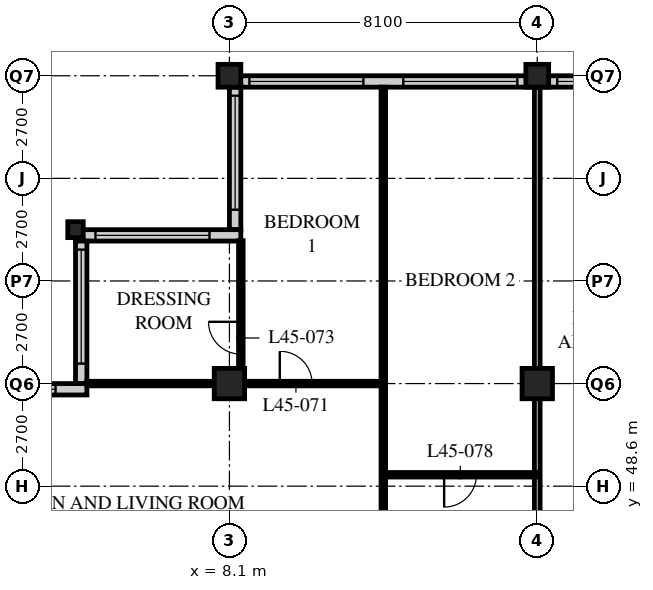
"""IFC4 building model, lengths in metres.
Left out: names, types, materials, properties, quantities, classifications, styles, units other than length and angle.
Written with IfcOpenShell. Run it as: python <this file> out.ifc"""

import sys

from ifc_helpers import new_model, si_unit, direction, frame, frame_2d, origin, origin_2d, place, context, subcontext, project, spatial, rectangle, hollow_rectangle, i_section, extrude, element, fill, save


model = new_model("IFC4")
c1 = context("Model", 3, precision=1e-05, world=origin(), true_north=direction((0.0, 1.0)))
c2 = subcontext(c1, "Body", "Model", "MODEL_VIEW")
j1 = project(units=[si_unit("LENGTHUNIT", "METRE"), si_unit("PLANEANGLEUNIT", "RADIAN")], contexts=[c1])
p1 = place(None, origin())
s1 = spatial("IfcSite", under=j1, at=p1, CompositionType="ELEMENT")
p2 = place(p1, origin())
s2 = spatial("IfcBuilding", under=s1, at=p2, CompositionType="ELEMENT")
p3 = place(p2, frame((0.0, 0.0, 177.6)))
s3 = spatial("IfcBuildingStorey", under=s2, at=p3, CompositionType="ELEMENT", Elevation=177.6)
p4 = place(p3, frame((4.05, 55.35, 0.0), z_axis=(0.0, 0.0, 1.0), x_axis=(1.0, 0.0, 0.0)))
e1 = element("IfcColumn", 1, at=p4, inside=s3, PredefinedType="COLUMN", context=c2, shape_type="SweptSolid", body=[
    extrude(i_section(OverallWidth=0.407, OverallDepth=0.419, WebThickness=0.031, FlangeThickness=0.049, FilletRadius=0.015, at=origin_2d()), origin(), (0.0, 0.0, 1.0), 3.6),
])
p5 = place(p3, frame((8.1, 51.3, 0.0), z_axis=(0.0, 0.0, 1.0), x_axis=(1.0, 0.0, 0.0)))
e2 = element("IfcColumn", 2, at=p5, inside=s3, PredefinedType="COLUMN", context=c2, shape_type="SweptSolid", body=[
    extrude(hollow_rectangle(XDim=0.8, YDim=0.8, WallThickness=0.08, at=origin_2d()), origin(), (0.0, 0.0, 1.0), 3.6),
])
p6 = place(p3, frame((8.1, 59.4, 0.0), z_axis=(0.0, 0.0, 1.0), x_axis=(1.0, 0.0, 0.0)))
e3 = element("IfcColumn", 3, at=p6, inside=s3, PredefinedType="COLUMN", context=c2, shape_type="SweptSolid", body=[
    extrude(hollow_rectangle(XDim=0.6, YDim=0.6, WallThickness=0.05, at=origin_2d()), origin(), (0.0, 0.0, 1.0), 3.6),
])
p7 = place(p3, frame((16.2, 51.3, 0.0), z_axis=(0.0, 0.0, 1.0), x_axis=(1.0, 0.0, 0.0)))
e4 = element("IfcColumn", 4, at=p7, inside=s3, PredefinedType="COLUMN", context=c2, shape_type="SweptSolid", body=[
    extrude(hollow_rectangle(XDim=0.8, YDim=0.8, WallThickness=0.08, at=origin_2d()), origin(), (0.0, 0.0, 1.0), 3.6),
])
p8 = place(p3, frame((16.2, 59.4, 0.0), z_axis=(0.0, 0.0, 1.0), x_axis=(1.0, 0.0, 0.0)))
e5 = element("IfcColumn", 5, at=p8, inside=s3, PredefinedType="COLUMN", context=c2, shape_type="SweptSolid", body=[
    extrude(hollow_rectangle(XDim=0.6, YDim=0.6, WallThickness=0.05, at=origin_2d()), origin(), (0.0, 0.0, 1.0), 3.6),
])
p9 = place(p3, frame((48.3, 59.25, 0.0), z_axis=(0.0, 0.0, 1.0), x_axis=(-1.0, 0.0, 0.0)))
e6 = element("IfcWall", 6, at=p9, inside=s3, PredefinedType="SOLIDWALL", context=c2, shape_type="SweptSolid", body=[
    extrude(rectangle(XDim=40.2, YDim=0.3, at=frame_2d((20.1, 0.0))), origin(), (0.0, 0.0, 1.0), 3.39),
])
p10 = place(p9, frame((0.225, 0.0, 0.6)))
e7 = element("IfcOpeningElement", 7, at=p10, cuts=e6, PredefinedType="OPENING", context=c2, shape_type="SweptSolid", body=[
    extrude(rectangle(XDim=3.0, YDim=2.4, at=frame_2d((1.5, 1.2))), frame((0.0, 0.16, 0.0), z_axis=(0.0, -1.0, 0.0), x_axis=(1.0, 0.0, 0.0)), (0.0, 0.0, 1.0), 0.32),
])
p11 = place(p9, frame((4.275, 0.0, 0.6)))
e8 = element("IfcOpeningElement", 8, at=p11, cuts=e6, PredefinedType="OPENING", context=c2, shape_type="SweptSolid", body=[
    extrude(rectangle(XDim=3.0, YDim=2.4, at=frame_2d((1.5, 1.2))), frame((0.0, 0.16, 0.0), z_axis=(0.0, -1.0, 0.0), x_axis=(1.0, 0.0, 0.0)), (0.0, 0.0, 1.0), 0.32),
])
p12 = place(p9, frame((8.325, 0.0, 0.6)))
e9 = element("IfcOpeningElement", 9, at=p12, cuts=e6, PredefinedType="OPENING", context=c2, shape_type="SweptSolid", body=[
    extrude(rectangle(XDim=3.0, YDim=2.4, at=frame_2d((1.5, 1.2))), frame((0.0, 0.16, 0.0), z_axis=(0.0, -1.0, 0.0), x_axis=(1.0, 0.0, 0.0)), (0.0, 0.0, 1.0), 0.32),
])
p13 = place(p9, frame((12.375, 0.0, 0.6)))
e10 = element("IfcOpeningElement", 10, at=p13, cuts=e6, PredefinedType="OPENING", context=c2, shape_type="SweptSolid", body=[
    extrude(rectangle(XDim=3.0, YDim=2.4, at=frame_2d((1.5, 1.2))), frame((0.0, 0.16, 0.0), z_axis=(0.0, -1.0, 0.0), x_axis=(1.0, 0.0, 0.0)), (0.0, 0.0, 1.0), 0.32),
])
p14 = place(p9, frame((16.425, 0.0, 0.6)))
e11 = element("IfcOpeningElement", 11, at=p14, cuts=e6, PredefinedType="OPENING", context=c2, shape_type="SweptSolid", body=[
    extrude(rectangle(XDim=3.0, YDim=2.4, at=frame_2d((1.5, 1.2))), frame((0.0, 0.16, 0.0), z_axis=(0.0, -1.0, 0.0), x_axis=(1.0, 0.0, 0.0)), (0.0, 0.0, 1.0), 0.32),
])
p15 = place(p9, frame((20.475, 0.0, 0.6)))
e12 = element("IfcOpeningElement", 12, at=p15, cuts=e6, PredefinedType="OPENING", context=c2, shape_type="SweptSolid", body=[
    extrude(rectangle(XDim=3.0, YDim=2.4, at=frame_2d((1.5, 1.2))), frame((0.0, 0.16, 0.0), z_axis=(0.0, -1.0, 0.0), x_axis=(1.0, 0.0, 0.0)), (0.0, 0.0, 1.0), 0.32),
])
p16 = place(p9, frame((24.525, 0.0, 0.6)))
e13 = element("IfcOpeningElement", 13, at=p16, cuts=e6, PredefinedType="OPENING", context=c2, shape_type="SweptSolid", body=[
    extrude(rectangle(XDim=3.0, YDim=2.4, at=frame_2d((1.5, 1.2))), frame((0.0, 0.16, 0.0), z_axis=(0.0, -1.0, 0.0), x_axis=(1.0, 0.0, 0.0)), (0.0, 0.0, 1.0), 0.32),
])
p17 = place(p9, frame((28.575, 0.0, 0.6)))
e14 = element("IfcOpeningElement", 14, at=p17, cuts=e6, PredefinedType="OPENING", context=c2, shape_type="SweptSolid", body=[
    extrude(rectangle(XDim=3.0, YDim=2.4, at=frame_2d((1.5, 1.2))), frame((0.0, 0.16, 0.0), z_axis=(0.0, -1.0, 0.0), x_axis=(1.0, 0.0, 0.0)), (0.0, 0.0, 1.0), 0.32),
])
p18 = place(p9, frame((32.625, 0.0, 0.6)))
e15 = element("IfcOpeningElement", 15, at=p18, cuts=e6, PredefinedType="OPENING", context=c2, shape_type="SweptSolid", body=[
    extrude(rectangle(XDim=3.0, YDim=2.4, at=frame_2d((1.5, 1.2))), frame((0.0, 0.16, 0.0), z_axis=(0.0, -1.0, 0.0), x_axis=(1.0, 0.0, 0.0)), (0.0, 0.0, 1.0), 0.32),
])
p19 = place(p9, frame((36.675, 0.0, 0.6)))
e16 = element("IfcOpeningElement", 16, at=p19, cuts=e6, PredefinedType="OPENING", context=c2, shape_type="SweptSolid", body=[
    extrude(rectangle(XDim=3.0, YDim=2.4, at=frame_2d((1.5, 1.2))), frame((0.0, 0.16, 0.0), z_axis=(0.0, -1.0, 0.0), x_axis=(1.0, 0.0, 0.0)), (0.0, 0.0, 1.0), 0.32),
])
p20 = place(p3, frame((8.25, 59.1, 0.0), z_axis=(0.0, 0.0, 1.0), x_axis=(0.0, -1.0, 0.0)))
e17 = element("IfcWall", 17, at=p20, inside=s3, PredefinedType="SOLIDWALL", context=c2, shape_type="SweptSolid", body=[
    extrude(rectangle(XDim=3.75, YDim=0.3, at=frame_2d((1.875, 0.0))), origin(), (0.0, 0.0, 1.0), 3.39),
])
p21 = place(p20, frame((0.225, 0.0, 0.6)))
e18 = element("IfcOpeningElement", 18, at=p21, cuts=e17, PredefinedType="OPENING", context=c2, shape_type="SweptSolid", body=[
    extrude(rectangle(XDim=3.0, YDim=2.0, at=frame_2d((1.5, 1.0))), frame((0.0, 0.16, 0.0), z_axis=(0.0, -1.0, 0.0), x_axis=(1.0, 0.0, 0.0)), (0.0, 0.0, 1.0), 0.32),
])
p22 = place(p3, frame((8.4, 55.2, 0.0), z_axis=(0.0, 0.0, 1.0), x_axis=(-1.0, 0.0, 0.0)))
e19 = element("IfcWall", 19, at=p22, inside=s3, PredefinedType="SOLIDWALL", context=c2, shape_type="SweptSolid", body=[
    extrude(rectangle(XDim=4.35, YDim=0.3, at=frame_2d((2.175, 0.0))), origin(), (0.0, 0.0, 1.0), 3.39),
])
p23 = place(p22, frame((0.825, 0.0, 0.6)))
e20 = element("IfcOpeningElement", 20, at=p23, cuts=e19, PredefinedType="OPENING", context=c2, shape_type="SweptSolid", body=[
    extrude(rectangle(XDim=3.0, YDim=2.0, at=frame_2d((1.5, 1.0))), frame((0.0, 0.16, 0.0), z_axis=(0.0, -1.0, 0.0), x_axis=(1.0, 0.0, 0.0)), (0.0, 0.0, 1.0), 0.32),
])
p24 = place(p3, frame((4.2, 55.05, 0.0), z_axis=(0.0, 0.0, 1.0), x_axis=(0.0, -1.0, 0.0)))
e21 = element("IfcWall", 21, at=p24, inside=s3, PredefinedType="SOLIDWALL", context=c2, shape_type="SweptSolid", body=[
    extrude(rectangle(XDim=3.75, YDim=0.3, at=frame_2d((1.875, 0.0))), origin(), (0.0, 0.0, 1.0), 3.39),
])
p25 = place(p24, frame((0.225, 0.0, 0.6)))
e22 = element("IfcOpeningElement", 22, at=p25, cuts=e21, PredefinedType="OPENING", context=c2, shape_type="SweptSolid", body=[
    extrude(rectangle(XDim=3.0, YDim=2.0, at=frame_2d((1.5, 1.0))), frame((0.0, 0.16, 0.0), z_axis=(0.0, -1.0, 0.0), x_axis=(1.0, 0.0, 0.0)), (0.0, 0.0, 1.0), 0.32),
])
p26 = place(p3, frame((4.35, 51.15, 0.0), z_axis=(0.0, 0.0, 1.0), x_axis=(-1.0, 0.0, 0.0)))
e23 = element("IfcWall", 23, at=p26, inside=s3, PredefinedType="SOLIDWALL", context=c2, shape_type="SweptSolid", body=[
    extrude(rectangle(XDim=4.35, YDim=0.3, at=frame_2d((2.175, 0.0))), origin(), (0.0, 0.0, 1.0), 3.39),
])
p27 = place(p26, frame((0.825, 0.0, 0.6)))
e24 = element("IfcOpeningElement", 24, at=p27, cuts=e23, PredefinedType="OPENING", context=c2, shape_type="SweptSolid", body=[
    extrude(rectangle(XDim=3.0, YDim=2.0, at=frame_2d((1.5, 1.0))), frame((0.0, 0.16, 0.0), z_axis=(0.0, -1.0, 0.0), x_axis=(1.0, 0.0, 0.0)), (0.0, 0.0, 1.0), 0.32),
])
p28 = place(p3, frame((12.15, 45.6, 0.0), z_axis=(0.0, 0.0, 1.0), x_axis=(0.0, 1.0, 0.0)))
e25 = element("IfcWall", 25, at=p28, inside=s3, PredefinedType="PARTITIONING", context=c2, shape_type="SweptSolid", body=[
    extrude(rectangle(XDim=13.5, YDim=0.12, at=frame_2d((6.75, 0.0))), origin(), (0.0, 0.0, 1.0), 3.39),
])
p29 = place(p3, frame((12.15, 51.3, 0.0), z_axis=(0.0, 0.0, 1.0), x_axis=(-1.0, 0.0, 0.0)))
e26 = element("IfcWall", 26, at=p29, inside=s3, PredefinedType="PARTITIONING", context=c2, shape_type="SweptSolid", body=[
    extrude(rectangle(XDim=7.8, YDim=0.12, at=frame_2d((3.9, 0.0))), origin(), (0.0, 0.0, 1.0), 2.778),
])
p30 = place(p29, frame((1.875, 0.0, 0.0)))
e27 = element("IfcOpeningElement", 27, at=p30, cuts=e26, PredefinedType="OPENING", context=c2, shape_type="SweptSolid", body=[
    extrude(rectangle(XDim=0.85, YDim=2.1, at=frame_2d((0.425, 1.05))), frame((0.0, 0.07, 0.0), z_axis=(0.0, -1.0, 0.0), x_axis=(1.0, 0.0, 0.0)), (0.0, 0.0, 1.0), 0.14),
])
p31 = place(p3, frame((16.2, 43.2, 0.0), z_axis=(0.0, 0.0, 1.0), x_axis=(0.0, 1.0, 0.0)))
e28 = element("IfcWall", 28, at=p31, inside=s3, PredefinedType="PARTITIONING", context=c2, shape_type="SweptSolid", body=[
    extrude(rectangle(XDim=15.9, YDim=0.15, at=frame_2d((7.95, 0.0))), origin(), (0.0, 0.0, 1.0), 2.778),
])
p32 = place(p3, frame((8.4, 55.06, 0.0), z_axis=(0.0, 0.0, 1.0), x_axis=(0.0, -1.0, 0.0)))
e29 = element("IfcWall", 29, at=p32, inside=s3, PredefinedType="PARTITIONING", context=c2, shape_type="SweptSolid", body=[
    extrude(rectangle(XDim=3.76, YDim=0.12, at=frame_2d((1.88, 0.0))), origin(), (0.0, 0.0, 1.0), 3.39),
])
p33 = place(p32, frame((2.135, 0.0, 0.0)))
e30 = element("IfcOpeningElement", 30, at=p33, cuts=e29, PredefinedType="OPENING", context=c2, shape_type="SweptSolid", body=[
    extrude(rectangle(XDim=0.85, YDim=2.1, at=frame_2d((0.425, 1.05))), frame((0.0, 0.07, 0.0), z_axis=(0.0, -1.0, 0.0), x_axis=(1.0, 0.0, 0.0)), (0.0, 0.0, 1.0), 0.14),
])
p34 = place(p3, frame((12.15, 48.9, 0.0), z_axis=(0.0, 0.0, 1.0), x_axis=(1.0, 0.0, 0.0)))
e31 = element("IfcWall", 31, at=p34, inside=s3, PredefinedType="PARTITIONING", context=c2, shape_type="SweptSolid", body=[
    extrude(rectangle(XDim=4.05, YDim=0.12, at=frame_2d((2.025, 0.0))), origin(), (0.0, 0.0, 1.0), 3.39),
])
p35 = place(p34, frame((1.6, 0.0, 0.0)))
e32 = element("IfcOpeningElement", 32, at=p35, cuts=e31, PredefinedType="OPENING", context=c2, shape_type="SweptSolid", body=[
    extrude(rectangle(XDim=0.85, YDim=2.1, at=frame_2d((0.425, 1.05))), frame((0.0, 0.07, 0.0), z_axis=(0.0, -1.0, 0.0), x_axis=(1.0, 0.0, 0.0)), (0.0, 0.0, 1.0), 0.14),
])
p36 = place(p17, origin())
e33 = element("IfcWindow", 33, at=p36, inside=s3, PartitioningType="SINGLE_PANEL", PredefinedType="WINDOW", context=c2, shape_type="SweptSolid", body=[
    extrude(rectangle(XDim=3.0, YDim=2.4, at=frame_2d((1.5, 1.2))), frame((0.0, 0.03, 0.0), z_axis=(0.0, -1.0, 0.0), x_axis=(1.0, 0.0, 0.0)), (0.0, 0.0, 1.0), 0.06),
])
fill(e14, e33)
p37 = place(p18, origin())
e34 = element("IfcWindow", 34, at=p37, inside=s3, PartitioningType="SINGLE_PANEL", PredefinedType="WINDOW", context=c2, shape_type="SweptSolid", body=[
    extrude(rectangle(XDim=3.0, YDim=2.4, at=frame_2d((1.5, 1.2))), frame((0.0, 0.03, 0.0), z_axis=(0.0, -1.0, 0.0), x_axis=(1.0, 0.0, 0.0)), (0.0, 0.0, 1.0), 0.06),
])
fill(e15, e34)
p38 = place(p19, origin())
e35 = element("IfcWindow", 35, at=p38, inside=s3, PartitioningType="SINGLE_PANEL", PredefinedType="WINDOW", context=c2, shape_type="SweptSolid", body=[
    extrude(rectangle(XDim=3.0, YDim=2.4, at=frame_2d((1.5, 1.2))), frame((0.0, 0.03, 0.0), z_axis=(0.0, -1.0, 0.0), x_axis=(1.0, 0.0, 0.0)), (0.0, 0.0, 1.0), 0.06),
])
fill(e16, e35)
p39 = place(p21, origin())
e36 = element("IfcWindow", 36, at=p39, inside=s3, PartitioningType="SINGLE_PANEL", PredefinedType="WINDOW", context=c2, shape_type="SweptSolid", body=[
    extrude(rectangle(XDim=3.0, YDim=2.0, at=frame_2d((1.5, 1.0))), frame((0.0, 0.03, 0.0), z_axis=(0.0, -1.0, 0.0), x_axis=(1.0, 0.0, 0.0)), (0.0, 0.0, 1.0), 0.06),
])
fill(e18, e36)
p40 = place(p23, origin())
e37 = element("IfcWindow", 37, at=p40, inside=s3, PartitioningType="SINGLE_PANEL", PredefinedType="WINDOW", context=c2, shape_type="SweptSolid", body=[
    extrude(rectangle(XDim=3.0, YDim=2.0, at=frame_2d((1.5, 1.0))), frame((0.0, 0.03, 0.0), z_axis=(0.0, -1.0, 0.0), x_axis=(1.0, 0.0, 0.0)), (0.0, 0.0, 1.0), 0.06),
])
fill(e20, e37)
p41 = place(p25, origin())
e38 = element("IfcWindow", 38, at=p41, inside=s3, PartitioningType="SINGLE_PANEL", PredefinedType="WINDOW", context=c2, shape_type="SweptSolid", body=[
    extrude(rectangle(XDim=3.0, YDim=2.0, at=frame_2d((1.5, 1.0))), frame((0.0, 0.03, 0.0), z_axis=(0.0, -1.0, 0.0), x_axis=(1.0, 0.0, 0.0)), (0.0, 0.0, 1.0), 0.06),
])
fill(e22, e38)
p42 = place(p27, origin())
e39 = element("IfcWindow", 39, at=p42, inside=s3, PartitioningType="SINGLE_PANEL", PredefinedType="WINDOW", context=c2, shape_type="SweptSolid", body=[
    extrude(rectangle(XDim=3.0, YDim=2.0, at=frame_2d((1.5, 1.0))), frame((0.0, 0.03, 0.0), z_axis=(0.0, -1.0, 0.0), x_axis=(1.0, 0.0, 0.0)), (0.0, 0.0, 1.0), 0.06),
])
fill(e24, e39)
p43 = place(p30, origin())
e40 = element("IfcDoor", 40, at=p43, inside=s3, OperationType="SINGLE_SWING_LEFT", PredefinedType="DOOR", context=c2, shape_type="SweptSolid", body=[
    extrude(rectangle(XDim=0.85, YDim=2.1, at=frame_2d((0.425, 1.05))), frame((0.0, 0.025, 0.0), z_axis=(0.0, -1.0, 0.0), x_axis=(1.0, 0.0, 0.0)), (0.0, 0.0, 1.0), 0.05),
])
fill(e27, e40)
p44 = place(p33, origin())
e41 = element("IfcDoor", 41, at=p44, inside=s3, OperationType="SINGLE_SWING_RIGHT", PredefinedType="DOOR", context=c2, shape_type="SweptSolid", body=[
    extrude(rectangle(XDim=0.85, YDim=2.1, at=frame_2d((0.425, 1.05))), frame((0.0, 0.025, 0.0), z_axis=(0.0, -1.0, 0.0), x_axis=(1.0, 0.0, 0.0)), (0.0, 0.0, 1.0), 0.05),
])
fill(e30, e41)
p45 = place(p35, origin())
e42 = element("IfcDoor", 42, at=p45, inside=s3, OperationType="SINGLE_SWING_RIGHT", PredefinedType="DOOR", context=c2, shape_type="SweptSolid", body=[
    extrude(rectangle(XDim=0.85, YDim=2.1, at=frame_2d((0.425, 1.05))), frame((0.0, 0.025, 0.0), z_axis=(0.0, -1.0, 0.0), x_axis=(1.0, 0.0, 0.0)), (0.0, 0.0, 1.0), 0.05),
])
fill(e32, e42)
save(model, sys.argv[1])
